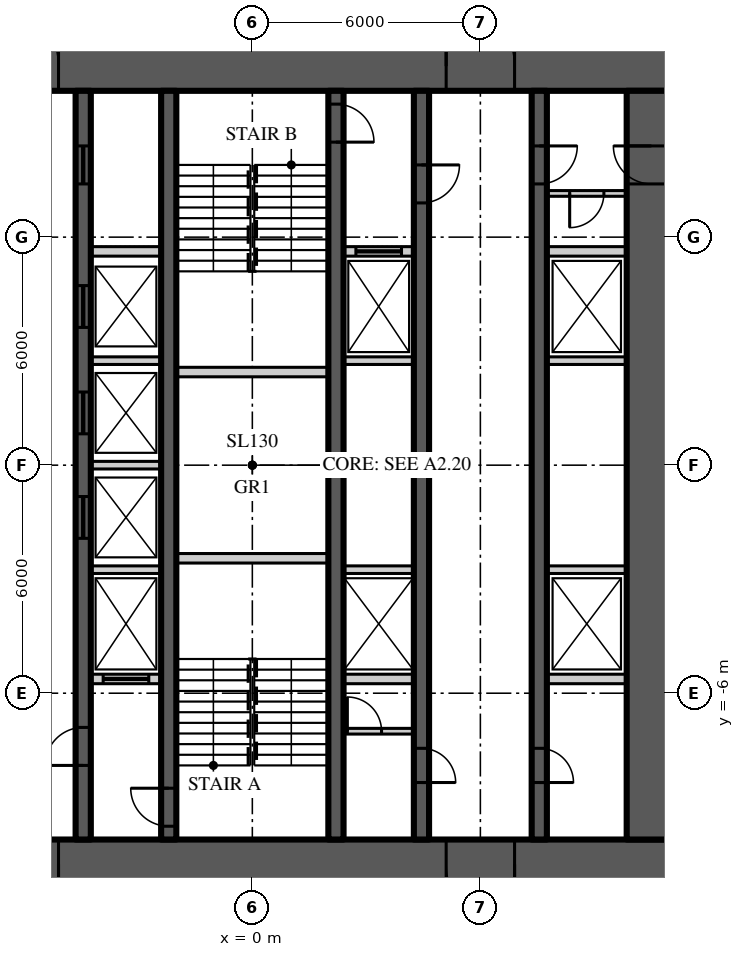
"""IFC4 building model, lengths in metres.
Left out: names, types, materials, properties, quantities, classifications, styles, units other than length and angle.
Written with IfcOpenShell. Run it as: python <this file> out.ifc"""

import sys

from ifc_helpers import new_model, si_unit, direction, frame, frame_2d, origin, place, context, subcontext, project, spatial, rectangle, extrude, element, fill, save


model = new_model("IFC4")
c1 = context("Model", 3, precision=1e-05, world=origin(), true_north=direction((0.0, 1.0)))
c2 = subcontext(c1, "Body", "Model", "MODEL_VIEW")
j1 = project(units=[si_unit("LENGTHUNIT", "METRE"), si_unit("PLANEANGLEUNIT", "RADIAN")], contexts=[c1])
p1 = place(None, origin())
s1 = spatial("IfcSite", under=j1, at=p1, CompositionType="ELEMENT")
p2 = place(p1, origin())
s2 = spatial("IfcBuilding", under=s1, at=p2, CompositionType="ELEMENT")
p3 = place(p2, frame((0.0, 0.0, 139.8)))
s3 = spatial("IfcBuildingStorey", under=s2, at=p3, CompositionType="ELEMENT", Elevation=139.8)
p4 = place(p3, frame((-11.15, 10.5, 0.0), z_axis=(0.0, 0.0, 1.0), x_axis=(1.0, 0.0, 0.0)))
e1 = element("IfcWall", 1, at=p4, inside=s3, PredefinedType="SHEAR", context=c2, shape_type="SweptSolid", body=[
    extrude(rectangle(XDim=22.3, YDim=1.3, at=frame_2d((11.15, 0.0))), origin(), (0.0, 0.0, 1.0), 3.9),
])
p5 = place(p4, frame((4.25, 0.0, 0.0)))
e2 = element("IfcOpeningElement", 2, at=p5, cuts=e1, PredefinedType="OPENING", context=c2, shape_type="SweptSolid", body=[
    extrude(rectangle(XDim=1.8, YDim=2.2, at=frame_2d((0.9, 1.1))), frame((0.0, 0.66, 0.0), z_axis=(0.0, -1.0, 0.0), x_axis=(1.0, 0.0, 0.0)), (0.0, 0.0, 1.0), 1.32),
])
p6 = place(p4, frame((16.25, 0.0, 0.0)))
e3 = element("IfcOpeningElement", 3, at=p6, cuts=e1, PredefinedType="OPENING", context=c2, shape_type="SweptSolid", body=[
    extrude(rectangle(XDim=1.8, YDim=2.2, at=frame_2d((0.9, 1.1))), frame((0.0, 0.66, 0.0), z_axis=(0.0, -1.0, 0.0), x_axis=(1.0, 0.0, 0.0)), (0.0, 0.0, 1.0), 1.32),
])
p7 = place(p3, frame((11.15, -10.5, 0.0), z_axis=(0.0, 0.0, 1.0), x_axis=(-1.0, 0.0, 0.0)))
e4 = element("IfcWall", 4, at=p7, inside=s3, PredefinedType="SHEAR", context=c2, shape_type="SweptSolid", body=[
    extrude(rectangle(XDim=22.3, YDim=1.3, at=frame_2d((11.15, 0.0))), origin(), (0.0, 0.0, 1.0), 3.9),
])
p8 = place(p7, frame((16.25, 0.0, 0.0)))
e5 = element("IfcOpeningElement", 5, at=p8, cuts=e4, PredefinedType="OPENING", context=c2, shape_type="SweptSolid", body=[
    extrude(rectangle(XDim=1.8, YDim=2.2, at=frame_2d((0.9, 1.1))), frame((0.0, 0.66, 0.0), z_axis=(0.0, -1.0, 0.0), x_axis=(1.0, 0.0, 0.0)), (0.0, 0.0, 1.0), 1.32),
])
p9 = place(p7, frame((4.25, 0.0, 0.0)))
e6 = element("IfcOpeningElement", 6, at=p9, cuts=e4, PredefinedType="OPENING", context=c2, shape_type="SweptSolid", body=[
    extrude(rectangle(XDim=1.8, YDim=2.2, at=frame_2d((0.9, 1.1))), frame((0.0, 0.66, 0.0), z_axis=(0.0, -1.0, 0.0), x_axis=(1.0, 0.0, 0.0)), (0.0, 0.0, 1.0), 1.32),
])
p10 = place(p3, frame((10.5, -9.85, 0.0), z_axis=(0.0, 0.0, 1.0), x_axis=(0.0, 1.0, 0.0)))
e7 = element("IfcWall", 7, at=p10, inside=s3, PredefinedType="SHEAR", context=c2, shape_type="SweptSolid", body=[
    extrude(rectangle(XDim=19.7, YDim=1.3, at=frame_2d((9.85, 0.0))), origin(), (0.0, 0.0, 1.0), 3.9),
])
p11 = place(p10, frame((17.25, 0.0, 0.0)))
e8 = element("IfcOpeningElement", 8, at=p11, cuts=e7, PredefinedType="OPENING", context=c2, shape_type="SweptSolid", body=[
    extrude(rectangle(XDim=1.0, YDim=2.2, at=frame_2d((0.5, 1.1))), frame((0.0, 0.66, 0.0), z_axis=(0.0, -1.0, 0.0), x_axis=(1.0, 0.0, 0.0)), (0.0, 0.0, 1.0), 1.32),
])
p12 = place(p3, frame((7.55, 9.85, 0.0), z_axis=(0.0, 0.0, 1.0), x_axis=(0.0, -1.0, 0.0)))
e9 = element("IfcWall", 9, at=p12, inside=s3, PredefinedType="SHEAR", context=c2, shape_type="SweptSolid", body=[
    extrude(rectangle(XDim=19.7, YDim=0.4, at=frame_2d((9.85, 0.0))), origin(), (0.0, 0.0, 1.0), 3.9),
])
p13 = place(p12, frame((1.45, 0.0, 0.0)))
e10 = element("IfcOpeningElement", 10, at=p13, cuts=e9, PredefinedType="OPENING", context=c2, shape_type="SweptSolid", body=[
    extrude(rectangle(XDim=1.0, YDim=2.2, at=frame_2d((0.5, 1.1))), frame((0.0, 0.21, 0.0), z_axis=(0.0, -1.0, 0.0), x_axis=(1.0, 0.0, 0.0)), (0.0, 0.0, 1.0), 0.42),
])
p14 = place(p12, frame((17.3, 0.0, 0.0)))
e11 = element("IfcOpeningElement", 11, at=p14, cuts=e9, PredefinedType="OPENING", context=c2, shape_type="SweptSolid", body=[
    extrude(rectangle(XDim=0.9, YDim=2.1, at=frame_2d((0.45, 1.05))), frame((0.0, 0.21, 0.0), z_axis=(0.0, -1.0, 0.0), x_axis=(1.0, 0.0, 0.0)), (0.0, 0.0, 1.0), 0.42),
])
p15 = place(p3, frame((-4.45, -9.85, 0.0), z_axis=(0.0, 0.0, 1.0), x_axis=(0.0, 1.0, 0.0)))
e12 = element("IfcWall", 12, at=p15, inside=s3, PredefinedType="SHEAR", context=c2, shape_type="SweptSolid", body=[
    extrude(rectangle(XDim=19.7, YDim=0.4, at=frame_2d((9.85, 0.0))), origin(), (0.0, 0.0, 1.0), 3.9),
])
p16 = place(p15, frame((1.95, 0.0, 0.0)))
e13 = element("IfcOpeningElement", 13, at=p16, cuts=e12, PredefinedType="OPENING", context=c2, shape_type="SweptSolid", body=[
    extrude(rectangle(XDim=1.0, YDim=2.2, at=frame_2d((0.5, 1.1))), frame((0.0, 0.21, 0.0), z_axis=(0.0, -1.0, 0.0), x_axis=(1.0, 0.0, 0.0)), (0.0, 0.0, 1.0), 0.42),
])
p17 = place(p15, frame((17.25, 0.0, 0.0)))
e14 = element("IfcOpeningElement", 14, at=p17, cuts=e12, PredefinedType="OPENING", context=c2, shape_type="SweptSolid", body=[
    extrude(rectangle(XDim=1.0, YDim=2.1, at=frame_2d((0.5, 1.05))), frame((0.0, 0.21, 0.0), z_axis=(0.0, -1.0, 0.0), x_axis=(1.0, 0.0, 0.0)), (0.0, 0.0, 1.0), 0.42),
])
p18 = place(p15, frame((7.925, 0.0, 0.0)))
e15 = element("IfcOpeningElement", 15, at=p18, cuts=e12, PredefinedType="OPENING", context=c2, shape_type="SweptSolid", body=[
    extrude(rectangle(XDim=1.1, YDim=2.2, at=frame_2d((0.55, 1.1))), frame((0.0, 0.21, 0.0), z_axis=(0.0, -1.0, 0.0), x_axis=(1.0, 0.0, 0.0)), (0.0, 0.0, 1.0), 0.42),
])
p19 = place(p15, frame((10.675, 0.0, 0.0)))
e16 = element("IfcOpeningElement", 16, at=p19, cuts=e12, PredefinedType="OPENING", context=c2, shape_type="SweptSolid", body=[
    extrude(rectangle(XDim=1.1, YDim=2.2, at=frame_2d((0.55, 1.1))), frame((0.0, 0.21, 0.0), z_axis=(0.0, -1.0, 0.0), x_axis=(1.0, 0.0, 0.0)), (0.0, 0.0, 1.0), 0.42),
])
p20 = place(p15, frame((13.475, 0.0, 0.0)))
e17 = element("IfcOpeningElement", 17, at=p20, cuts=e12, PredefinedType="OPENING", context=c2, shape_type="SweptSolid", body=[
    extrude(rectangle(XDim=1.1, YDim=2.2, at=frame_2d((0.55, 1.1))), frame((0.0, 0.21, 0.0), z_axis=(0.0, -1.0, 0.0), x_axis=(1.0, 0.0, 0.0)), (0.0, 0.0, 1.0), 0.42),
])
p21 = place(p3, frame((4.45, 9.85, 0.0), z_axis=(0.0, 0.0, 1.0), x_axis=(0.0, -1.0, 0.0)))
e18 = element("IfcWall", 18, at=p21, inside=s3, PredefinedType="SHEAR", context=c2, shape_type="SweptSolid", body=[
    extrude(rectangle(XDim=19.7, YDim=0.4, at=frame_2d((9.85, 0.0))), origin(), (0.0, 0.0, 1.0), 3.9),
])
p22 = place(p21, frame((1.95, 0.0, 0.0)))
e19 = element("IfcOpeningElement", 19, at=p22, cuts=e18, PredefinedType="OPENING", context=c2, shape_type="SweptSolid", body=[
    extrude(rectangle(XDim=1.0, YDim=2.2, at=frame_2d((0.5, 1.1))), frame((0.0, 0.21, 0.0), z_axis=(0.0, -1.0, 0.0), x_axis=(1.0, 0.0, 0.0)), (0.0, 0.0, 1.0), 0.42),
])
p23 = place(p21, frame((17.3, 0.0, 0.0)))
e20 = element("IfcOpeningElement", 20, at=p23, cuts=e18, PredefinedType="OPENING", context=c2, shape_type="SweptSolid", body=[
    extrude(rectangle(XDim=0.9, YDim=2.1, at=frame_2d((0.45, 1.05))), frame((0.0, 0.21, 0.0), z_axis=(0.0, -1.0, 0.0), x_axis=(1.0, 0.0, 0.0)), (0.0, 0.0, 1.0), 0.42),
])
p24 = place(p3, frame((-2.2, -9.85, 0.0), z_axis=(0.0, 0.0, 1.0), x_axis=(0.0, 1.0, 0.0)))
e21 = element("IfcWall", 21, at=p24, inside=s3, PredefinedType="SHEAR", context=c2, shape_type="SweptSolid", body=[
    extrude(rectangle(XDim=19.7, YDim=0.4, at=frame_2d((9.85, 0.0))), origin(), (0.0, 0.0, 1.0), 3.9),
])
p25 = place(p24, frame((0.35, 0.0, 0.0)))
e22 = element("IfcOpeningElement", 22, at=p25, cuts=e21, PredefinedType="OPENING", context=c2, shape_type="SweptSolid", body=[
    extrude(rectangle(XDim=1.0, YDim=2.2, at=frame_2d((0.5, 1.1))), frame((0.0, 0.21, 0.0), z_axis=(0.0, -1.0, 0.0), x_axis=(1.0, 0.0, 0.0)), (0.0, 0.0, 1.0), 0.42),
])
p26 = place(p3, frame((2.2, 9.85, 0.0), z_axis=(0.0, 0.0, 1.0), x_axis=(0.0, -1.0, 0.0)))
e23 = element("IfcWall", 23, at=p26, inside=s3, PredefinedType="SHEAR", context=c2, shape_type="SweptSolid", body=[
    extrude(rectangle(XDim=19.7, YDim=0.4, at=frame_2d((9.85, 0.0))), origin(), (0.0, 0.0, 1.0), 3.9),
])
p27 = place(p26, frame((0.35, 0.0, 0.0)))
e24 = element("IfcOpeningElement", 24, at=p27, cuts=e23, PredefinedType="OPENING", context=c2, shape_type="SweptSolid", body=[
    extrude(rectangle(XDim=1.0, YDim=2.2, at=frame_2d((0.5, 1.1))), frame((0.0, 0.21, 0.0), z_axis=(0.0, -1.0, 0.0), x_axis=(1.0, 0.0, 0.0)), (0.0, 0.0, 1.0), 0.42),
])
p28 = place(p3, frame((-4.25, 5.625, 0.0), z_axis=(0.0, 0.0, 1.0), x_axis=(1.0, 0.0, 0.0)))
e25 = element("IfcWall", 25, at=p28, inside=s3, PredefinedType="SOLIDWALL", context=c2, shape_type="SweptSolid", body=[
    extrude(rectangle(XDim=1.85, YDim=0.25, at=frame_2d((0.925, 0.0))), origin(), (0.0, 0.0, 1.0), 3.7),
])
p29 = place(p3, frame((2.4, 5.625, 0.0), z_axis=(0.0, 0.0, 1.0), x_axis=(1.0, 0.0, 0.0)))
e26 = element("IfcWall", 26, at=p29, inside=s3, PredefinedType="SOLIDWALL", context=c2, shape_type="SweptSolid", body=[
    extrude(rectangle(XDim=1.85, YDim=0.25, at=frame_2d((0.925, 0.0))), origin(), (0.0, 0.0, 1.0), 3.7),
])
p30 = place(p29, frame((0.325, 0.0, 0.0)))
e27 = element("IfcOpeningElement", 27, at=p30, cuts=e26, PredefinedType="OPENING", context=c2, shape_type="SweptSolid", body=[
    extrude(rectangle(XDim=1.2, YDim=2.2, at=frame_2d((0.6, 1.1))), frame((0.0, 0.135, 0.0), z_axis=(0.0, -1.0, 0.0), x_axis=(1.0, 0.0, 0.0)), (0.0, 0.0, 1.0), 0.27),
])
p31 = place(p3, frame((7.75, 5.625, 0.0), z_axis=(0.0, 0.0, 1.0), x_axis=(1.0, 0.0, 0.0)))
e28 = element("IfcWall", 28, at=p31, inside=s3, PredefinedType="SOLIDWALL", context=c2, shape_type="SweptSolid", body=[
    extrude(rectangle(XDim=2.1, YDim=0.25, at=frame_2d((1.05, 0.0))), origin(), (0.0, 0.0, 1.0), 3.7),
])
p32 = place(p3, frame((-4.25, -5.625, 0.0), z_axis=(0.0, 0.0, 1.0), x_axis=(1.0, 0.0, 0.0)))
e29 = element("IfcWall", 29, at=p32, inside=s3, PredefinedType="SOLIDWALL", context=c2, shape_type="SweptSolid", body=[
    extrude(rectangle(XDim=1.85, YDim=0.25, at=frame_2d((0.925, 0.0))), origin(), (0.0, 0.0, 1.0), 3.7),
])
p33 = place(p32, frame((0.325, 0.0, 0.0)))
e30 = element("IfcOpeningElement", 30, at=p33, cuts=e29, PredefinedType="OPENING", context=c2, shape_type="SweptSolid", body=[
    extrude(rectangle(XDim=1.2, YDim=2.2, at=frame_2d((0.6, 1.1))), frame((0.0, 0.135, 0.0), z_axis=(0.0, -1.0, 0.0), x_axis=(1.0, 0.0, 0.0)), (0.0, 0.0, 1.0), 0.27),
])
p34 = place(p3, frame((2.4, -5.625, 0.0), z_axis=(0.0, 0.0, 1.0), x_axis=(1.0, 0.0, 0.0)))
e31 = element("IfcWall", 31, at=p34, inside=s3, PredefinedType="SOLIDWALL", context=c2, shape_type="SweptSolid", body=[
    extrude(rectangle(XDim=1.85, YDim=0.25, at=frame_2d((0.925, 0.0))), origin(), (0.0, 0.0, 1.0), 3.7),
])
p35 = place(p3, frame((7.75, -5.625, 0.0), z_axis=(0.0, 0.0, 1.0), x_axis=(1.0, 0.0, 0.0)))
e32 = element("IfcWall", 32, at=p35, inside=s3, PredefinedType="SOLIDWALL", context=c2, shape_type="SweptSolid", body=[
    extrude(rectangle(XDim=2.1, YDim=0.25, at=frame_2d((1.05, 0.0))), origin(), (0.0, 0.0, 1.0), 3.7),
])
for number, where, z_axis, x_axis in (
    (33, (-2.0, -2.45, 0.0), (0.0, 0.0, 1.0), (1.0, 0.0, 0.0)),
    (34, (-2.0, 2.45, 0.0), (0.0, 0.0, 1.0), (1.0, 0.0, 0.0)),
):
    element("IfcWall", number, at=place(p3, frame(where, z_axis=z_axis, x_axis=x_axis)), inside=s3, PredefinedType="SOLIDWALL", context=c2, shape_type="SweptSolid", body=[
        extrude(rectangle(XDim=4.0, YDim=0.25, at=frame_2d((2.0, 0.0))), origin(), (0.0, 0.0, 1.0), 3.7),
    ])
for number, where, z_axis, x_axis in (
    (35, (-4.25, -2.75, 0.0), (0.0, 0.0, 1.0), (1.0, 0.0, 0.0)),
    (36, (2.4, -2.75, 0.0), (0.0, 0.0, 1.0), (1.0, 0.0, 0.0)),
):
    element("IfcWall", number, at=place(p3, frame(where, z_axis=z_axis, x_axis=x_axis)), inside=s3, PredefinedType="SOLIDWALL", context=c2, shape_type="SweptSolid", body=[
        extrude(rectangle(XDim=1.85, YDim=0.2, at=frame_2d((0.925, 0.0))), origin(), (0.0, 0.0, 1.0), 3.7),
    ])
p36 = place(p3, frame((7.75, -2.75, 0.0), z_axis=(0.0, 0.0, 1.0), x_axis=(1.0, 0.0, 0.0)))
e37 = element("IfcWall", 37, at=p36, inside=s3, PredefinedType="SOLIDWALL", context=c2, shape_type="SweptSolid", body=[
    extrude(rectangle(XDim=2.1, YDim=0.2, at=frame_2d((1.05, 0.0))), origin(), (0.0, 0.0, 1.0), 3.7),
])
for number, where, z_axis, x_axis in (
    (38, (-4.25, 0.0, 0.0), (0.0, 0.0, 1.0), (1.0, 0.0, 0.0)),
    (39, (-4.25, 2.75, 0.0), (0.0, 0.0, 1.0), (1.0, 0.0, 0.0)),
    (40, (2.4, 2.75, 0.0), (0.0, 0.0, 1.0), (1.0, 0.0, 0.0)),
):
    element("IfcWall", number, at=place(p3, frame(where, z_axis=z_axis, x_axis=x_axis)), inside=s3, PredefinedType="SOLIDWALL", context=c2, shape_type="SweptSolid", body=[
        extrude(rectangle(XDim=1.85, YDim=0.2, at=frame_2d((0.925, 0.0))), origin(), (0.0, 0.0, 1.0), 3.7),
    ])
p37 = place(p3, frame((7.75, 2.75, 0.0), z_axis=(0.0, 0.0, 1.0), x_axis=(1.0, 0.0, 0.0)))
e41 = element("IfcWall", 41, at=p37, inside=s3, PredefinedType="SOLIDWALL", context=c2, shape_type="SweptSolid", body=[
    extrude(rectangle(XDim=2.1, YDim=0.2, at=frame_2d((1.05, 0.0))), origin(), (0.0, 0.0, 1.0), 3.7),
])
p38 = place(p3, frame((2.4, -7.0, 0.0), z_axis=(0.0, 0.0, 1.0), x_axis=(1.0, 0.0, 0.0)))
e42 = element("IfcWall", 42, at=p38, inside=s3, PredefinedType="SOLIDWALL", context=c2, shape_type="SweptSolid", body=[
    extrude(rectangle(XDim=1.85, YDim=0.15, at=frame_2d((0.925, 0.0))), origin(), (0.0, 0.0, 1.0), 3.77),
])
p39 = place(p38, frame((0.1, 0.0, 0.0)))
e43 = element("IfcOpeningElement", 43, at=p39, cuts=e42, PredefinedType="OPENING", context=c2, shape_type="SweptSolid", body=[
    extrude(rectangle(XDim=0.9, YDim=2.1, at=frame_2d((0.45, 1.05))), frame((0.0, 0.085, 0.0), z_axis=(0.0, -1.0, 0.0), x_axis=(1.0, 0.0, 0.0)), (0.0, 0.0, 1.0), 0.17),
])
p40 = place(p3, frame((9.85, 7.15, 0.0), z_axis=(0.0, 0.0, 1.0), x_axis=(-1.0, 0.0, 0.0)))
e44 = element("IfcWall", 44, at=p40, inside=s3, PredefinedType="SOLIDWALL", context=c2, shape_type="SweptSolid", body=[
    extrude(rectangle(XDim=2.1, YDim=0.15, at=frame_2d((1.05, 0.0))), origin(), (0.0, 0.0, 1.0), 3.77),
])
p41 = place(p40, frame((0.6, 0.0, 0.0)))
e45 = element("IfcOpeningElement", 45, at=p41, cuts=e44, PredefinedType="OPENING", context=c2, shape_type="SweptSolid", body=[
    extrude(rectangle(XDim=0.9, YDim=2.1, at=frame_2d((0.45, 1.05))), frame((0.0, 0.085, 0.0), z_axis=(0.0, -1.0, 0.0), x_axis=(1.0, 0.0, 0.0)), (0.0, 0.0, 1.0), 0.17),
])
p42 = place(p5, origin())
e46 = element("IfcDoor", 46, at=p42, inside=s3, OperationType="DOUBLE_DOOR_DOUBLE_SWING", PredefinedType="DOOR", context=c2, shape_type="SweptSolid", body=[
    extrude(rectangle(XDim=1.8, YDim=2.2, at=frame_2d((0.9, 1.1))), frame((0.0, 0.025, 0.0), z_axis=(0.0, -1.0, 0.0), x_axis=(1.0, 0.0, 0.0)), (0.0, 0.0, 1.0), 0.05),
])
fill(e2, e46)
p43 = place(p8, origin())
e47 = element("IfcDoor", 47, at=p43, inside=s3, OperationType="DOUBLE_DOOR_DOUBLE_SWING", PredefinedType="DOOR", context=c2, shape_type="SweptSolid", body=[
    extrude(rectangle(XDim=1.8, YDim=2.2, at=frame_2d((0.9, 1.1))), frame((0.0, 0.025, 0.0), z_axis=(0.0, -1.0, 0.0), x_axis=(1.0, 0.0, 0.0)), (0.0, 0.0, 1.0), 0.05),
])
fill(e5, e47)
p44 = place(p6, origin())
e48 = element("IfcDoor", 48, at=p44, inside=s3, OperationType="DOUBLE_DOOR_DOUBLE_SWING", PredefinedType="DOOR", context=c2, shape_type="SweptSolid", body=[
    extrude(rectangle(XDim=1.8, YDim=2.2, at=frame_2d((0.9, 1.1))), frame((0.0, 0.025, 0.0), z_axis=(0.0, -1.0, 0.0), x_axis=(1.0, 0.0, 0.0)), (0.0, 0.0, 1.0), 0.05),
])
fill(e3, e48)
p45 = place(p9, origin())
e49 = element("IfcDoor", 49, at=p45, inside=s3, OperationType="DOUBLE_DOOR_DOUBLE_SWING", PredefinedType="DOOR", context=c2, shape_type="SweptSolid", body=[
    extrude(rectangle(XDim=1.8, YDim=2.2, at=frame_2d((0.9, 1.1))), frame((0.0, 0.025, 0.0), z_axis=(0.0, -1.0, 0.0), x_axis=(1.0, 0.0, 0.0)), (0.0, 0.0, 1.0), 0.05),
])
fill(e6, e49)
p46 = place(p13, origin())
e50 = element("IfcDoor", 50, at=p46, inside=s3, OperationType="SINGLE_SWING_LEFT", PredefinedType="DOOR", context=c2, shape_type="SweptSolid", body=[
    extrude(rectangle(XDim=1.0, YDim=2.2, at=frame_2d((0.5, 1.1))), frame((0.0, 0.025, 0.0), z_axis=(0.0, -1.0, 0.0), x_axis=(1.0, 0.0, 0.0)), (0.0, 0.0, 1.0), 0.05),
])
fill(e10, e50)
p47 = place(p11, origin())
e51 = element("IfcDoor", 51, at=p47, inside=s3, OperationType="SINGLE_SWING_RIGHT", PredefinedType="DOOR", context=c2, shape_type="SweptSolid", body=[
    extrude(rectangle(XDim=1.0, YDim=2.2, at=frame_2d((0.5, 1.1))), frame((0.0, 0.025, 0.0), z_axis=(0.0, -1.0, 0.0), x_axis=(1.0, 0.0, 0.0)), (0.0, 0.0, 1.0), 0.05),
])
fill(e8, e51)
p48 = place(p16, origin())
e52 = element("IfcDoor", 52, at=p48, inside=s3, OperationType="SINGLE_SWING_LEFT", PredefinedType="DOOR", context=c2, shape_type="SweptSolid", body=[
    extrude(rectangle(XDim=1.0, YDim=2.2, at=frame_2d((0.5, 1.1))), frame((0.0, 0.025, 0.0), z_axis=(0.0, -1.0, 0.0), x_axis=(1.0, 0.0, 0.0)), (0.0, 0.0, 1.0), 0.05),
])
fill(e13, e52)
p49 = place(p25, origin())
e53 = element("IfcDoor", 53, at=p49, inside=s3, OperationType="SINGLE_SWING_RIGHT", PredefinedType="DOOR", context=c2, shape_type="SweptSolid", body=[
    extrude(rectangle(XDim=1.0, YDim=2.2, at=frame_2d((0.5, 1.1))), frame((0.0, 0.025, 0.0), z_axis=(0.0, -1.0, 0.0), x_axis=(1.0, 0.0, 0.0)), (0.0, 0.0, 1.0), 0.05),
])
fill(e22, e53)
p50 = place(p22, origin())
e54 = element("IfcDoor", 54, at=p50, inside=s3, OperationType="SINGLE_SWING_LEFT", PredefinedType="DOOR", context=c2, shape_type="SweptSolid", body=[
    extrude(rectangle(XDim=1.0, YDim=2.2, at=frame_2d((0.5, 1.1))), frame((0.0, 0.025, 0.0), z_axis=(0.0, -1.0, 0.0), x_axis=(1.0, 0.0, 0.0)), (0.0, 0.0, 1.0), 0.05),
])
fill(e19, e54)
p51 = place(p27, origin())
e55 = element("IfcDoor", 55, at=p51, inside=s3, OperationType="SINGLE_SWING_RIGHT", PredefinedType="DOOR", context=c2, shape_type="SweptSolid", body=[
    extrude(rectangle(XDim=1.0, YDim=2.2, at=frame_2d((0.5, 1.1))), frame((0.0, 0.025, 0.0), z_axis=(0.0, -1.0, 0.0), x_axis=(1.0, 0.0, 0.0)), (0.0, 0.0, 1.0), 0.05),
])
fill(e24, e55)
p52 = place(p17, origin())
e56 = element("IfcDoor", 56, at=p52, inside=s3, OperationType="SLIDING_TO_LEFT", PredefinedType="DOOR", context=c2, shape_type="SweptSolid", body=[
    extrude(rectangle(XDim=1.0, YDim=2.1, at=frame_2d((0.5, 1.05))), frame((0.0, 0.025, 0.0), z_axis=(0.0, -1.0, 0.0), x_axis=(1.0, 0.0, 0.0)), (0.0, 0.0, 1.0), 0.05),
])
fill(e14, e56)
p53 = place(p14, origin())
e57 = element("IfcDoor", 57, at=p53, inside=s3, OperationType="SINGLE_SWING_RIGHT", PredefinedType="DOOR", context=c2, shape_type="SweptSolid", body=[
    extrude(rectangle(XDim=0.9, YDim=2.1, at=frame_2d((0.45, 1.05))), frame((0.0, 0.025, 0.0), z_axis=(0.0, -1.0, 0.0), x_axis=(1.0, 0.0, 0.0)), (0.0, 0.0, 1.0), 0.05),
])
fill(e11, e57)
p54 = place(p23, origin())
e58 = element("IfcDoor", 58, at=p54, inside=s3, OperationType="SINGLE_SWING_RIGHT", PredefinedType="DOOR", context=c2, shape_type="SweptSolid", body=[
    extrude(rectangle(XDim=0.9, YDim=2.1, at=frame_2d((0.45, 1.05))), frame((0.0, 0.025, 0.0), z_axis=(0.0, -1.0, 0.0), x_axis=(1.0, 0.0, 0.0)), (0.0, 0.0, 1.0), 0.05),
])
fill(e20, e58)
p55 = place(p18, origin())
e59 = element("IfcDoor", 59, at=p55, inside=s3, OperationType="SLIDING_TO_LEFT", PredefinedType="DOOR", context=c2, shape_type="SweptSolid", body=[
    extrude(rectangle(XDim=1.1, YDim=2.2, at=frame_2d((0.55, 1.1))), frame((0.0, 0.025, 0.0), z_axis=(0.0, -1.0, 0.0), x_axis=(1.0, 0.0, 0.0)), (0.0, 0.0, 1.0), 0.05),
])
fill(e15, e59)
p56 = place(p19, origin())
e60 = element("IfcDoor", 60, at=p56, inside=s3, OperationType="SLIDING_TO_LEFT", PredefinedType="DOOR", context=c2, shape_type="SweptSolid", body=[
    extrude(rectangle(XDim=1.1, YDim=2.2, at=frame_2d((0.55, 1.1))), frame((0.0, 0.025, 0.0), z_axis=(0.0, -1.0, 0.0), x_axis=(1.0, 0.0, 0.0)), (0.0, 0.0, 1.0), 0.05),
])
fill(e16, e60)
p57 = place(p20, origin())
e61 = element("IfcDoor", 61, at=p57, inside=s3, OperationType="SLIDING_TO_LEFT", PredefinedType="DOOR", context=c2, shape_type="SweptSolid", body=[
    extrude(rectangle(XDim=1.1, YDim=2.2, at=frame_2d((0.55, 1.1))), frame((0.0, 0.025, 0.0), z_axis=(0.0, -1.0, 0.0), x_axis=(1.0, 0.0, 0.0)), (0.0, 0.0, 1.0), 0.05),
])
fill(e17, e61)
p58 = place(p33, origin())
e62 = element("IfcDoor", 62, at=p58, inside=s3, OperationType="SLIDING_TO_LEFT", PredefinedType="DOOR", context=c2, shape_type="SweptSolid", body=[
    extrude(rectangle(XDim=1.2, YDim=2.2, at=frame_2d((0.6, 1.1))), frame((0.0, 0.025, 0.0), z_axis=(0.0, -1.0, 0.0), x_axis=(1.0, 0.0, 0.0)), (0.0, 0.0, 1.0), 0.05),
])
fill(e30, e62)
p59 = place(p30, origin())
e63 = element("IfcDoor", 63, at=p59, inside=s3, OperationType="SLIDING_TO_LEFT", PredefinedType="DOOR", context=c2, shape_type="SweptSolid", body=[
    extrude(rectangle(XDim=1.2, YDim=2.2, at=frame_2d((0.6, 1.1))), frame((0.0, 0.025, 0.0), z_axis=(0.0, -1.0, 0.0), x_axis=(1.0, 0.0, 0.0)), (0.0, 0.0, 1.0), 0.05),
])
fill(e27, e63)
p60 = place(p39, origin())
e64 = element("IfcDoor", 64, at=p60, inside=s3, OperationType="SINGLE_SWING_LEFT", PredefinedType="DOOR", context=c2, shape_type="SweptSolid", body=[
    extrude(rectangle(XDim=0.9, YDim=2.1, at=frame_2d((0.45, 1.05))), frame((0.0, 0.025, 0.0), z_axis=(0.0, -1.0, 0.0), x_axis=(1.0, 0.0, 0.0)), (0.0, 0.0, 1.0), 0.05),
])
fill(e43, e64)
p61 = place(p41, origin())
e65 = element("IfcDoor", 65, at=p61, inside=s3, OperationType="SINGLE_SWING_RIGHT", PredefinedType="DOOR", context=c2, shape_type="SweptSolid", body=[
    extrude(rectangle(XDim=0.9, YDim=2.1, at=frame_2d((0.45, 1.05))), frame((0.0, 0.025, 0.0), z_axis=(0.0, -1.0, 0.0), x_axis=(1.0, 0.0, 0.0)), (0.0, 0.0, 1.0), 0.05),
])
fill(e45, e65)
save(model, sys.argv[1])
